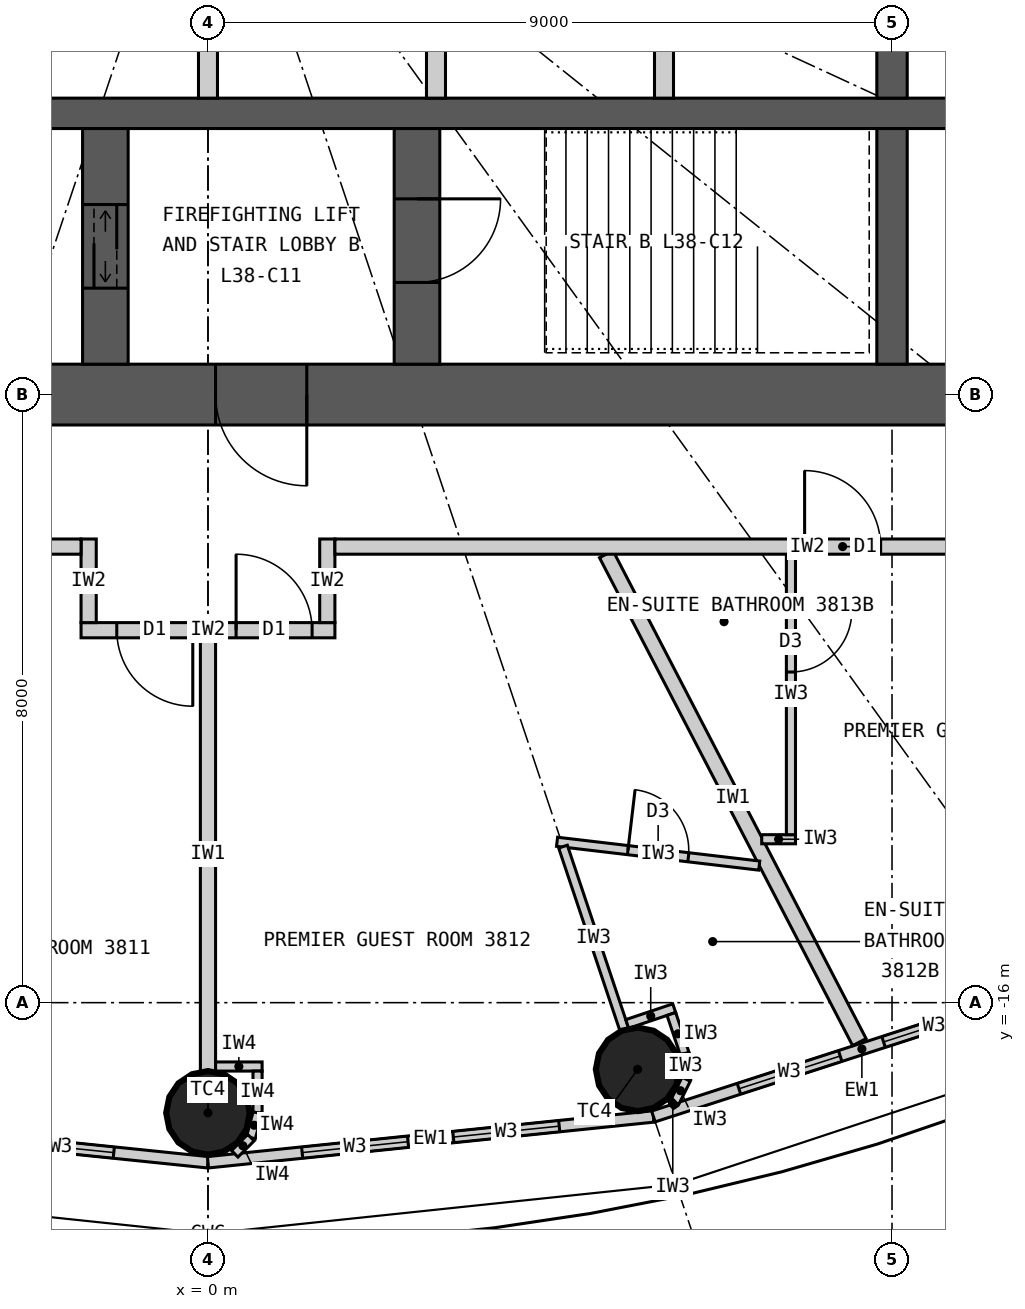
"""IFC4 building model, lengths in metres.
Left out: names, types, materials, properties, quantities, classifications, styles, units other than length and angle.
Written with IfcOpenShell. Run it as: python <this file> out.ifc"""

import sys

from ifc_helpers import new_model, si_unit, direction, frame, frame_2d, origin, origin_2d, place, context, subcontext, project, spatial, rectangle, circle, extrude, element, fill, save


model = new_model("IFC4")
c1 = context("Model", 3, precision=1e-05, world=origin(), true_north=direction((0.0, 1.0)))
c2 = subcontext(c1, "Body", "Model", "MODEL_VIEW")
j1 = project(units=[si_unit("LENGTHUNIT", "METRE"), si_unit("PLANEANGLEUNIT", "RADIAN")], contexts=[c1])
p1 = place(None, origin())
s1 = spatial("IfcSite", under=j1, at=p1, CompositionType="ELEMENT")
p2 = place(p1, origin())
s2 = spatial("IfcBuilding", under=s1, at=p2, CompositionType="ELEMENT")
p3 = place(p2, frame((0.0, 0.0, 146.7)))
s3 = spatial("IfcBuildingStorey", under=s2, at=p3, CompositionType="ELEMENT", Elevation=146.7)
for number, where, z_axis, x_axis in (
    (1, (0.0, -17.45, 0.0), (0.0, 0.0, 1.0), (1.0, 0.0, 0.0)),
    (2, (5.653, -16.877, 0.0), (0.0, 0.0, 1.0), (1.0, 0.0, 0.0)),
):
    element("IfcColumn", number, at=place(p3, frame(where, z_axis=z_axis, x_axis=x_axis)), inside=s3, PredefinedType="COLUMN", context=c2, shape_type="SweptSolid", body=[
        extrude(circle(Radius=0.55, at=origin_2d()), origin(), (0.0, 0.0, 1.0), 3.3),
    ])
p4 = place(p3, frame((12.4, -8.0, 0.0), z_axis=(0.0, 0.0, 1.0), x_axis=(-1.0, 0.0, 0.0)))
e3 = element("IfcWall", 3, at=p4, inside=s3, PredefinedType="SHEAR", context=c2, shape_type="SweptSolid", body=[
    extrude(rectangle(XDim=24.8, YDim=0.8, at=frame_2d((12.4, 0.0))), origin(), (0.0, 0.0, 1.0), 3.3),
])
p5 = place(p4, frame((11.1, 0.0, 0.0)))
e4 = element("IfcOpeningElement", 4, at=p5, cuts=e3, PredefinedType="OPENING", context=c2, shape_type="SweptSolid", body=[
    extrude(rectangle(XDim=1.2, YDim=2.2, at=frame_2d((0.6, 1.1))), frame((0.0, 0.41, 0.0), z_axis=(0.0, -1.0, 0.0), x_axis=(1.0, 0.0, 0.0)), (0.0, 0.0, 1.0), 0.82),
])
p6 = place(p4, frame((18.7, 0.0, 0.0)))
e5 = element("IfcOpeningElement", 5, at=p6, cuts=e3, PredefinedType="OPENING", context=c2, shape_type="SweptSolid", body=[
    extrude(rectangle(XDim=0.9, YDim=2.2, at=frame_2d((0.45, 1.1))), frame((0.0, 0.41, 0.0), z_axis=(0.0, -1.0, 0.0), x_axis=(1.0, 0.0, 0.0)), (0.0, 0.0, 1.0), 0.82),
])
p7 = place(p3, frame((-11.6, -4.3, 0.0), z_axis=(0.0, 0.0, 1.0), x_axis=(1.0, 0.0, 0.0)))
e6 = element("IfcWall", 6, at=p7, inside=s3, PredefinedType="SHEAR", context=c2, shape_type="SweptSolid", body=[
    extrude(rectangle(XDim=23.2, YDim=0.4, at=frame_2d((11.6, 0.0))), origin(), (0.0, 0.0, 1.0), 3.3),
])
p8 = place(p3, frame((9.0, -4.1, 0.0), z_axis=(0.0, 0.0, 1.0), x_axis=(0.0, 1.0, 0.0)))
e7 = element("IfcWall", 7, at=p8, inside=s3, PredefinedType="SHEAR", context=c2, shape_type="SweptSolid", body=[
    extrude(rectangle(XDim=2.35, YDim=0.4, at=frame_2d((1.175, 0.0))), origin(), (0.0, 0.0, 1.0), 3.3),
])
p9 = place(p3, frame((9.0, -7.6, 0.0), z_axis=(0.0, 0.0, 1.0), x_axis=(0.0, 1.0, 0.0)))
e8 = element("IfcWall", 8, at=p9, inside=s3, PredefinedType="SHEAR", context=c2, shape_type="SweptSolid", body=[
    extrude(rectangle(XDim=3.1, YDim=0.4, at=frame_2d((1.55, 0.0))), origin(), (0.0, 0.0, 1.0), 3.3),
])
p10 = place(p3, frame((2.75, -7.6, 0.0), z_axis=(0.0, 0.0, 1.0), x_axis=(0.0, 1.0, 0.0)))
e9 = element("IfcWall", 9, at=p10, inside=s3, PredefinedType="SHEAR", context=c2, shape_type="SweptSolid", body=[
    extrude(rectangle(XDim=3.1, YDim=0.6, at=frame_2d((1.55, 0.0))), origin(), (0.0, 0.0, 1.0), 3.3),
])
p11 = place(p10, frame((1.075, 0.0, 0.0)))
e10 = element("IfcOpeningElement", 10, at=p11, cuts=e9, PredefinedType="OPENING", context=c2, shape_type="SweptSolid", body=[
    extrude(rectangle(XDim=1.1, YDim=2.2, at=frame_2d((0.55, 1.1))), frame((0.0, 0.31, 0.0), z_axis=(0.0, -1.0, 0.0), x_axis=(1.0, 0.0, 0.0)), (0.0, 0.0, 1.0), 0.62),
])
p12 = place(p3, frame((-1.35, -7.6, 0.0), z_axis=(0.0, 0.0, 1.0), x_axis=(0.0, 1.0, 0.0)))
e11 = element("IfcWall", 11, at=p12, inside=s3, PredefinedType="SHEAR", context=c2, shape_type="SweptSolid", body=[
    extrude(rectangle(XDim=3.1, YDim=0.6, at=frame_2d((1.55, 0.0))), origin(), (0.0, 0.0, 1.0), 3.3),
])
p13 = place(p12, frame((1.0, 0.0, 0.0)))
e12 = element("IfcOpeningElement", 12, at=p13, cuts=e11, PredefinedType="OPENING", context=c2, shape_type="SweptSolid", body=[
    extrude(rectangle(XDim=1.1, YDim=2.2, at=frame_2d((0.55, 1.1))), frame((0.0, 0.31, 0.0), z_axis=(0.0, -1.0, 0.0), x_axis=(1.0, 0.0, 0.0)), (0.0, 0.0, 1.0), 0.62),
])
for number, where, z_axis, x_axis in (
    (13, (0.0, -4.1, 0.0), (0.0, 0.0, 1.0), (0.0, 1.0, 0.0)),
    (14, (3.0, -4.1, 0.0), (0.0, 0.0, 1.0), (0.0, 1.0, 0.0)),
    (15, (6.0, -4.1, 0.0), (0.0, 0.0, 1.0), (0.0, 1.0, 0.0)),
):
    element("IfcWall", number, at=place(p3, frame(where, z_axis=z_axis, x_axis=x_axis)), inside=s3, PredefinedType="PARTITIONING", context=c2, shape_type="SweptSolid", body=[
        extrude(rectangle(XDim=2.35, YDim=0.25, at=frame_2d((1.175, 0.0))), origin(), (0.0, 0.0, 1.0), 3.3),
    ])
p14 = place(p3, frame((-5.86, -17.497, 0.0), z_axis=(0.0, 0.0, 1.0), x_axis=(0.994751738032, -0.102318032045, 0.0)))
e16 = element("IfcWall", 16, at=p14, inside=s3, PredefinedType="ELEMENTEDWALL", context=c2, shape_type="SweptSolid", body=[
    extrude(rectangle(XDim=5.891, YDim=0.15, at=frame_2d((2.946, 0.0))), origin(), (0.0, 0.0, 1.0), 3.12),
])
p15 = place(p14, frame((1.246, 0.0, 0.9)))
e17 = element("IfcOpeningElement", 17, at=p15, cuts=e16, PredefinedType="OPENING", context=c2, shape_type="SweptSolid", body=[
    extrude(rectangle(XDim=1.4, YDim=1.9, at=frame_2d((0.7, 0.95))), frame((0.0, 0.085, 0.0), z_axis=(0.0, -1.0, 0.0), x_axis=(1.0, 0.0, 0.0)), (0.0, 0.0, 1.0), 0.17),
])
p16 = place(p14, frame((3.246, 0.0, 0.9)))
e18 = element("IfcOpeningElement", 18, at=p16, cuts=e16, PredefinedType="OPENING", context=c2, shape_type="SweptSolid", body=[
    extrude(rectangle(XDim=1.4, YDim=1.9, at=frame_2d((0.7, 0.95))), frame((0.0, 0.085, 0.0), z_axis=(0.0, -1.0, 0.0), x_axis=(1.0, 0.0, 0.0)), (0.0, 0.0, 1.0), 0.17),
])
p17 = place(p3, frame((0.0, -18.1, 0.0), z_axis=(0.0, 0.0, 1.0), x_axis=(0.994751738032, 0.102318032045, 0.0)))
e19 = element("IfcWall", 19, at=p17, inside=s3, PredefinedType="ELEMENTEDWALL", context=c2, shape_type="SweptSolid", body=[
    extrude(rectangle(XDim=5.891, YDim=0.15, at=frame_2d((2.946, 0.0))), origin(), (0.0, 0.0, 1.0), 3.12),
])
p18 = place(p17, frame((1.246, 0.0, 0.9)))
e20 = element("IfcOpeningElement", 20, at=p18, cuts=e19, PredefinedType="OPENING", context=c2, shape_type="SweptSolid", body=[
    extrude(rectangle(XDim=1.4, YDim=1.9, at=frame_2d((0.7, 0.95))), frame((0.0, 0.085, 0.0), z_axis=(0.0, -1.0, 0.0), x_axis=(1.0, 0.0, 0.0)), (0.0, 0.0, 1.0), 0.17),
])
p19 = place(p17, frame((3.246, 0.0, 0.9)))
e21 = element("IfcOpeningElement", 21, at=p19, cuts=e19, PredefinedType="OPENING", context=c2, shape_type="SweptSolid", body=[
    extrude(rectangle(XDim=1.4, YDim=1.9, at=frame_2d((0.7, 0.95))), frame((0.0, 0.085, 0.0), z_axis=(0.0, -1.0, 0.0), x_axis=(1.0, 0.0, 0.0)), (0.0, 0.0, 1.0), 0.17),
])
p20 = place(p3, frame((5.86, -17.497, 0.0), z_axis=(0.0, 0.0, 1.0), x_axis=(0.951432482129, 0.307857486429, 0.0)))
e22 = element("IfcWall", 22, at=p20, inside=s3, PredefinedType="ELEMENTEDWALL", context=c2, shape_type="SweptSolid", body=[
    extrude(rectangle(XDim=5.766, YDim=0.15, at=frame_2d((2.883, 0.0))), origin(), (0.0, 0.0, 1.0), 3.12),
])
p21 = place(p20, frame((1.183, 0.0, 0.9)))
e23 = element("IfcOpeningElement", 23, at=p21, cuts=e22, PredefinedType="OPENING", context=c2, shape_type="SweptSolid", body=[
    extrude(rectangle(XDim=1.4, YDim=1.9, at=frame_2d((0.7, 0.95))), frame((0.0, 0.085, 0.0), z_axis=(0.0, -1.0, 0.0), x_axis=(1.0, 0.0, 0.0)), (0.0, 0.0, 1.0), 0.17),
])
p22 = place(p20, frame((3.183, 0.0, 0.9)))
e24 = element("IfcOpeningElement", 24, at=p22, cuts=e22, PredefinedType="OPENING", context=c2, shape_type="SweptSolid", body=[
    extrude(rectangle(XDim=1.4, YDim=1.9, at=frame_2d((0.7, 0.95))), frame((0.0, 0.085, 0.0), z_axis=(0.0, -1.0, 0.0), x_axis=(1.0, 0.0, 0.0)), (0.0, 0.0, 1.0), 0.17),
])
p23 = place(p3, frame((0.0, -11.2, 0.0), z_axis=(0.0, 0.0, 1.0), x_axis=(0.0, -1.0, 0.0)))
e25 = element("IfcWall", 25, at=p23, inside=s3, PredefinedType="PARTITIONING", context=c2, shape_type="SweptSolid", body=[
    extrude(rectangle(XDim=5.7, YDim=0.2, at=frame_2d((2.85, 0.0))), origin(), (0.0, 0.0, 1.0), 2.42),
])
p24 = place(p3, frame((5.24, -10.1, 0.0), z_axis=(0.0, 0.0, 1.0), x_axis=(0.460532965373, -0.887642601391, 0.0)))
e26 = element("IfcWall", 26, at=p24, inside=s3, PredefinedType="PARTITIONING", context=c2, shape_type="SweptSolid", body=[
    extrude(rectangle(XDim=7.231, YDim=0.2, at=frame_2d((3.616, 0.0))), origin(), (0.0, 0.0, 1.0), 3.12),
])
p25 = place(p3, frame((1.67, -11.1, 0.0), z_axis=(0.0, 0.0, 1.0), x_axis=(-1.0, 0.0, 0.0)))
e27 = element("IfcWall", 27, at=p25, inside=s3, PredefinedType="PARTITIONING", context=c2, shape_type="SweptSolid", body=[
    extrude(rectangle(XDim=3.34, YDim=0.2, at=frame_2d((1.67, 0.0))), origin(), (0.0, 0.0, 1.0), 3.12),
])
p26 = place(p25, frame((1.87, 0.0, 0.0)))
e28 = element("IfcOpeningElement", 28, at=p26, cuts=e27, PredefinedType="OPENING", context=c2, shape_type="SweptSolid", body=[
    extrude(rectangle(XDim=1.0, YDim=2.2, at=frame_2d((0.5, 1.1))), frame((0.0, 0.11, 0.0), z_axis=(0.0, -1.0, 0.0), x_axis=(1.0, 0.0, 0.0)), (0.0, 0.0, 1.0), 0.22),
])
p27 = place(p25, frame((0.3, 0.0, 0.0)))
e29 = element("IfcOpeningElement", 29, at=p27, cuts=e27, PredefinedType="OPENING", context=c2, shape_type="SweptSolid", body=[
    extrude(rectangle(XDim=1.0, YDim=2.2, at=frame_2d((0.5, 1.1))), frame((0.0, 0.11, 0.0), z_axis=(0.0, -1.0, 0.0), x_axis=(1.0, 0.0, 0.0)), (0.0, 0.0, 1.0), 0.22),
])
for number, where, z_axis, x_axis in (
    (30, (1.57, -9.9, 0.0), (0.0, 0.0, 1.0), (0.0, -1.0, 0.0)),
    (31, (-1.57, -9.9, 0.0), (0.0, 0.0, 1.0), (0.0, -1.0, 0.0)),
):
    element("IfcWall", number, at=place(p3, frame(where, z_axis=z_axis, x_axis=x_axis)), inside=s3, PredefinedType="PARTITIONING", context=c2, shape_type="SweptSolid", body=[
        extrude(rectangle(XDim=1.1, YDim=0.2, at=frame_2d((0.55, 0.0))), origin(), (0.0, 0.0, 1.0), 3.12),
    ])
p28 = place(p3, frame((7.253, -14.197, 0.0), z_axis=(0.0, 0.0, 1.0), x_axis=(-0.993128188393, 0.117031625725, 0.0)))
e32 = element("IfcWall", 32, at=p28, inside=s3, PredefinedType="PARTITIONING", context=c2, shape_type="SweptSolid", body=[
    extrude(rectangle(XDim=2.678, YDim=0.12, at=frame_2d((1.339, 0.0))), origin(), (0.0, 0.0, 1.0), 3.12),
])
p29 = place(p28, frame((0.939, 0.0, 0.0)))
e33 = element("IfcOpeningElement", 33, at=p29, cuts=e32, PredefinedType="OPENING", context=c2, shape_type="SweptSolid", body=[
    extrude(rectangle(XDim=0.8, YDim=2.1, at=frame_2d((0.4, 1.05))), frame((0.0, 0.07, 0.0), z_axis=(0.0, -1.0, 0.0), x_axis=(1.0, 0.0, 0.0)), (0.0, 0.0, 1.0), 0.14),
])
p30 = place(p3, frame((4.671, -13.948, 0.0), z_axis=(0.0, 0.0, 1.0), x_axis=(0.317669167093, -0.948201613729, 0.0)))
e34 = element("IfcWall", 34, at=p30, inside=s3, PredefinedType="PARTITIONING", context=c2, shape_type="SweptSolid", body=[
    extrude(rectangle(XDim=2.54, YDim=0.12, at=frame_2d((1.27, 0.0))), origin(), (0.0, 0.0, 1.0), 2.42),
])
p31 = place(p3, frame((5.516, -16.28, 0.0), z_axis=(0.0, 0.0, 1.0), x_axis=(0.948157944392, 0.317799484717, 0.0)))
e35 = element("IfcWall", 35, at=p31, inside=s3, PredefinedType="PARTITIONING", context=c2, shape_type="SweptSolid", body=[
    extrude(rectangle(XDim=0.652, YDim=0.12, at=frame_2d((0.326, 0.0))), origin(), (0.0, 0.0, 1.0), 3.12),
])
p32 = place(p3, frame((6.097, -16.149, 0.0), z_axis=(0.0, 0.0, 1.0), x_axis=(0.317292604854, -0.948327687514, 0.0)))
e36 = element("IfcWall", 36, at=p32, inside=s3, PredefinedType="PARTITIONING", context=c2, shape_type="SweptSolid", body=[
    extrude(rectangle(XDim=0.55, YDim=0.12, at=frame_2d((0.275, 0.0))), origin(), (0.0, 0.0, 1.0), 3.12),
])
for number, where, z_axis, x_axis in (
    (37, (6.271, -16.67, 0.0), (0.0, 0.0, 1.0), (0.061, -0.998, 0.0)),
    (38, (6.292, -17.007, 0.0), (0.0, 0.0, 1.0), (-0.445, -0.895, 0.0)),
):
    element("IfcWall", number, at=place(p3, frame(where, z_axis=z_axis, x_axis=x_axis)), inside=s3, PredefinedType="PARTITIONING", context=c2, shape_type="SweptSolid", body=[
        extrude(rectangle(XDim=0.338, YDim=0.12, at=frame_2d((0.169, 0.0))), origin(), (0.0, 0.0, 1.0), 3.12),
    ])
p33 = place(p3, frame((6.142, -17.31, 0.0), z_axis=(0.0, 0.0, 1.0), x_axis=(-0.835039693181, -0.550189704386, 0.0)))
e39 = element("IfcWall", 39, at=p33, inside=s3, PredefinedType="PARTITIONING", context=c2, shape_type="SweptSolid", body=[
    extrude(rectangle(XDim=0.062, YDim=0.12, at=frame_2d((0.031, 0.0))), origin(), (0.0, 0.0, 1.0), 3.12),
])
p34 = place(p3, frame((7.286, -13.85, 0.0), z_axis=(0.0, 0.0, 1.0), x_axis=(1.0, 0.0, 0.0)))
e40 = element("IfcWall", 40, at=p34, inside=s3, PredefinedType="PARTITIONING", context=c2, shape_type="SweptSolid", body=[
    extrude(rectangle(XDim=0.444, YDim=0.12, at=frame_2d((0.222, 0.0))), origin(), (0.0, 0.0, 1.0), 3.12),
])
p35 = place(p3, frame((7.67, -10.1, 0.0), z_axis=(0.0, 0.0, 1.0), x_axis=(0.0, -1.0, 0.0)))
e41 = element("IfcWall", 41, at=p35, inside=s3, PredefinedType="PARTITIONING", context=c2, shape_type="SweptSolid", body=[
    extrude(rectangle(XDim=3.69, YDim=0.12, at=frame_2d((1.845, 0.0))), origin(), (0.0, 0.0, 1.0), 3.12),
])
p36 = place(p35, frame((0.75, 0.0, 0.0)))
e42 = element("IfcOpeningElement", 42, at=p36, cuts=e41, PredefinedType="OPENING", context=c2, shape_type="SweptSolid", body=[
    extrude(rectangle(XDim=0.8, YDim=2.1, at=frame_2d((0.4, 1.05))), frame((0.0, 0.07, 0.0), z_axis=(0.0, -1.0, 0.0), x_axis=(1.0, 0.0, 0.0)), (0.0, 0.0, 1.0), 0.14),
])
p37 = place(p3, frame((14.1, -10.0, 0.0), z_axis=(0.0, 0.0, 1.0), x_axis=(-1.0, 0.0, 0.0)))
e43 = element("IfcWall", 43, at=p37, inside=s3, PredefinedType="PARTITIONING", context=c2, shape_type="SweptSolid", body=[
    extrude(rectangle(XDim=12.43, YDim=0.2, at=frame_2d((6.215, 0.0))), origin(), (0.0, 0.0, 1.0), 3.12),
])
p38 = place(p37, frame((5.25, 0.0, 0.0)))
e44 = element("IfcOpeningElement", 44, at=p38, cuts=e43, PredefinedType="OPENING", context=c2, shape_type="SweptSolid", body=[
    extrude(rectangle(XDim=1.0, YDim=2.2, at=frame_2d((0.5, 1.1))), frame((0.0, 0.11, 0.0), z_axis=(0.0, -1.0, 0.0), x_axis=(1.0, 0.0, 0.0)), (0.0, 0.0, 1.0), 0.22),
])
p39 = place(p3, frame((-1.67, -10.0, 0.0), z_axis=(0.0, 0.0, 1.0), x_axis=(-1.0, 0.0, 0.0)))
e45 = element("IfcWall", 45, at=p39, inside=s3, PredefinedType="PARTITIONING", context=c2, shape_type="SweptSolid", body=[
    extrude(rectangle(XDim=12.43, YDim=0.2, at=frame_2d((6.215, 0.0))), origin(), (0.0, 0.0, 1.0), 3.12),
])
p40 = place(p39, frame((9.655, 0.0, 0.0)))
e46 = element("IfcOpeningElement", 46, at=p40, cuts=e45, PredefinedType="OPENING", context=c2, shape_type="SweptSolid", body=[
    extrude(rectangle(XDim=1.0, YDim=2.2, at=frame_2d((0.5, 1.1))), frame((0.0, 0.11, 0.0), z_axis=(0.0, -1.0, 0.0), x_axis=(1.0, 0.0, 0.0)), (0.0, 0.0, 1.0), 0.22),
])
p41 = place(p3, frame((0.1, -16.84, 0.0), z_axis=(0.0, 0.0, 1.0), x_axis=(1.0, 0.0, 0.0)))
e47 = element("IfcWall", 47, at=p41, inside=s3, PredefinedType="PARTITIONING", context=c2, shape_type="SweptSolid", body=[
    extrude(rectangle(XDim=0.612, YDim=0.12, at=frame_2d((0.306, 0.0))), origin(), (0.0, 0.0, 1.0), 3.12),
])
p42 = place(p3, frame((0.652, -16.9, 0.0), z_axis=(0.0, 0.0, 1.0), x_axis=(0.0, -1.0, 0.0)))
e48 = element("IfcWall", 48, at=p42, inside=s3, PredefinedType="PARTITIONING", context=c2, shape_type="SweptSolid", body=[
    extrude(rectangle(XDim=0.55, YDim=0.12, at=frame_2d((0.275, 0.0))), origin(), (0.0, 0.0, 1.0), 3.12),
])
p43 = place(p3, frame((0.652, -17.45, 0.0), z_axis=(0.0, 0.0, 1.0), x_axis=(-0.258832454679, -0.965922233104, 0.0)))
e49 = element("IfcWall", 49, at=p43, inside=s3, PredefinedType="PARTITIONING", context=c2, shape_type="SweptSolid", body=[
    extrude(rectangle(XDim=0.338, YDim=0.12, at=frame_2d((0.169, 0.0))), origin(), (0.0, 0.0, 1.0), 3.12),
])
p44 = place(p3, frame((0.565, -17.776, 0.0), z_axis=(0.0, 0.0, 1.0), x_axis=(-0.707106781187, -0.707106781187, 0.0)))
e50 = element("IfcWall", 50, at=p44, inside=s3, PredefinedType="PARTITIONING", context=c2, shape_type="SweptSolid", body=[
    extrude(rectangle(XDim=0.301, YDim=0.12, at=frame_2d((0.15, 0.0))), origin(), (0.0, 0.0, 1.0), 3.12),
])
p45 = place(p16, origin())
e51 = element("IfcWindow", 51, at=p45, inside=s3, PartitioningType="SINGLE_PANEL", PredefinedType="WINDOW", context=c2, shape_type="SweptSolid", body=[
    extrude(rectangle(XDim=1.4, YDim=1.9, at=frame_2d((0.7, 0.95))), frame((0.0, 0.03, 0.0), z_axis=(0.0, -1.0, 0.0), x_axis=(1.0, 0.0, 0.0)), (0.0, 0.0, 1.0), 0.06),
])
fill(e18, e51)
p46 = place(p18, origin())
e52 = element("IfcWindow", 52, at=p46, inside=s3, PartitioningType="SINGLE_PANEL", PredefinedType="WINDOW", context=c2, shape_type="SweptSolid", body=[
    extrude(rectangle(XDim=1.4, YDim=1.9, at=frame_2d((0.7, 0.95))), frame((0.0, 0.03, 0.0), z_axis=(0.0, -1.0, 0.0), x_axis=(1.0, 0.0, 0.0)), (0.0, 0.0, 1.0), 0.06),
])
fill(e20, e52)
p47 = place(p19, origin())
e53 = element("IfcWindow", 53, at=p47, inside=s3, PartitioningType="SINGLE_PANEL", PredefinedType="WINDOW", context=c2, shape_type="SweptSolid", body=[
    extrude(rectangle(XDim=1.4, YDim=1.9, at=frame_2d((0.7, 0.95))), frame((0.0, 0.03, 0.0), z_axis=(0.0, -1.0, 0.0), x_axis=(1.0, 0.0, 0.0)), (0.0, 0.0, 1.0), 0.06),
])
fill(e21, e53)
p48 = place(p21, origin())
e54 = element("IfcWindow", 54, at=p48, inside=s3, PartitioningType="SINGLE_PANEL", PredefinedType="WINDOW", context=c2, shape_type="SweptSolid", body=[
    extrude(rectangle(XDim=1.4, YDim=1.9, at=frame_2d((0.7, 0.95))), frame((0.0, 0.03, 0.0), z_axis=(0.0, -1.0, 0.0), x_axis=(1.0, 0.0, 0.0)), (0.0, 0.0, 1.0), 0.06),
])
fill(e23, e54)
p49 = place(p22, origin())
e55 = element("IfcWindow", 55, at=p49, inside=s3, PartitioningType="SINGLE_PANEL", PredefinedType="WINDOW", context=c2, shape_type="SweptSolid", body=[
    extrude(rectangle(XDim=1.4, YDim=1.9, at=frame_2d((0.7, 0.95))), frame((0.0, 0.03, 0.0), z_axis=(0.0, -1.0, 0.0), x_axis=(1.0, 0.0, 0.0)), (0.0, 0.0, 1.0), 0.06),
])
fill(e24, e55)
p50 = place(p26, origin())
e56 = element("IfcDoor", 56, at=p50, inside=s3, OperationType="SINGLE_SWING_LEFT", PredefinedType="DOOR", context=c2, shape_type="SweptSolid", body=[
    extrude(rectangle(XDim=1.0, YDim=2.2, at=frame_2d((0.5, 1.1))), frame((0.0, 0.025, 0.0), z_axis=(0.0, -1.0, 0.0), x_axis=(1.0, 0.0, 0.0)), (0.0, 0.0, 1.0), 0.05),
])
fill(e28, e56)
p51 = place(p29, origin())
e57 = element("IfcDoor", 57, at=p51, inside=s3, OperationType="SINGLE_SWING_RIGHT", PredefinedType="DOOR", context=c2, shape_type="SweptSolid", body=[
    extrude(rectangle(XDim=0.8, YDim=2.1, at=frame_2d((0.4, 1.05))), frame((0.0, 0.025, 0.0), z_axis=(0.0, -1.0, 0.0), x_axis=(1.0, 0.0, 0.0)), (0.0, 0.0, 1.0), 0.05),
])
fill(e33, e57)
p52 = place(p27, origin())
e58 = element("IfcDoor", 58, at=p52, inside=s3, OperationType="SINGLE_SWING_RIGHT", PredefinedType="DOOR", context=c2, shape_type="SweptSolid", body=[
    extrude(rectangle(XDim=1.0, YDim=2.2, at=frame_2d((0.5, 1.1))), frame((0.0, 0.025, 0.0), z_axis=(0.0, -1.0, 0.0), x_axis=(1.0, 0.0, 0.0)), (0.0, 0.0, 1.0), 0.05),
])
fill(e29, e58)
p53 = place(p36, origin())
e59 = element("IfcDoor", 59, at=p53, inside=s3, OperationType="SINGLE_SWING_LEFT", PredefinedType="DOOR", context=c2, shape_type="SweptSolid", body=[
    extrude(rectangle(XDim=0.8, YDim=2.1, at=frame_2d((0.4, 1.05))), frame((0.0, 0.025, 0.0), z_axis=(0.0, -1.0, 0.0), x_axis=(1.0, 0.0, 0.0)), (0.0, 0.0, 1.0), 0.05),
])
fill(e42, e59)
p54 = place(p38, origin())
e60 = element("IfcDoor", 60, at=p54, inside=s3, OperationType="SINGLE_SWING_RIGHT", PredefinedType="DOOR", context=c2, shape_type="SweptSolid", body=[
    extrude(rectangle(XDim=1.0, YDim=2.2, at=frame_2d((0.5, 1.1))), frame((0.0, 0.025, 0.0), z_axis=(0.0, -1.0, 0.0), x_axis=(1.0, 0.0, 0.0)), (0.0, 0.0, 1.0), 0.05),
])
fill(e44, e60)
p55 = place(p5, origin())
e61 = element("IfcDoor", 61, at=p55, inside=s3, OperationType="SINGLE_SWING_LEFT", PredefinedType="DOOR", context=c2, shape_type="SweptSolid", body=[
    extrude(rectangle(XDim=1.2, YDim=2.2, at=frame_2d((0.6, 1.1))), frame((0.0, 0.025, 0.0), z_axis=(0.0, -1.0, 0.0), x_axis=(1.0, 0.0, 0.0)), (0.0, 0.0, 1.0), 0.05),
])
fill(e4, e61)
p56 = place(p11, origin())
e62 = element("IfcDoor", 62, at=p56, inside=s3, OperationType="SINGLE_SWING_RIGHT", PredefinedType="DOOR", context=c2, shape_type="SweptSolid", body=[
    extrude(rectangle(XDim=1.1, YDim=2.2, at=frame_2d((0.55, 1.1))), frame((0.0, 0.025, 0.0), z_axis=(0.0, -1.0, 0.0), x_axis=(1.0, 0.0, 0.0)), (0.0, 0.0, 1.0), 0.05),
])
fill(e10, e62)
p57 = place(p13, origin())
e63 = element("IfcDoor", 63, at=p57, inside=s3, OperationType="DOUBLE_DOOR_SLIDING", PredefinedType="DOOR", context=c2, shape_type="SweptSolid", body=[
    extrude(rectangle(XDim=1.1, YDim=2.2, at=frame_2d((0.55, 1.1))), frame((0.0, 0.025, 0.0), z_axis=(0.0, -1.0, 0.0), x_axis=(1.0, 0.0, 0.0)), (0.0, 0.0, 1.0), 0.05),
])
fill(e12, e63)
save(model, sys.argv[1])
